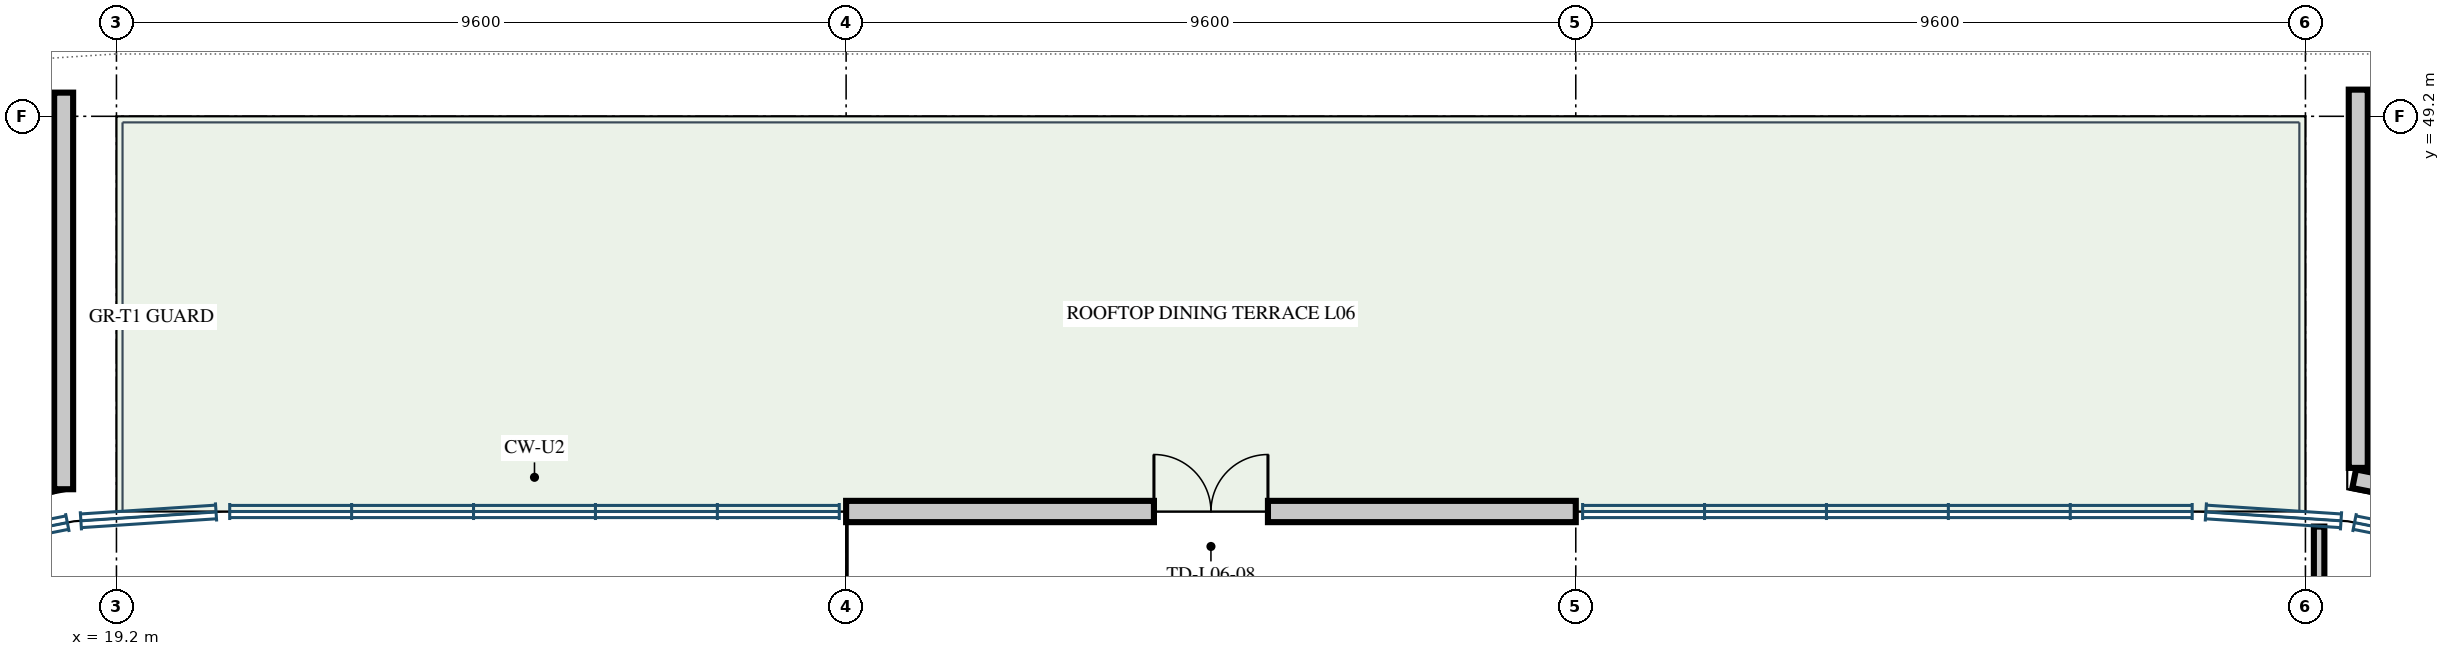
"""IFC4 building model, lengths in metres.
Left out: names, types, materials, properties, quantities, classifications, styles, units other than length and angle.
Written with IfcOpenShell. Run it as: python <this file> out.ifc"""

import sys

from ifc_helpers import new_model, si_unit, direction, frame, frame_2d, origin, place, context, subcontext, project, spatial, rectangle, extrude, element, fill, save


model = new_model("IFC4")
c1 = context("Model", 3, precision=1e-05, world=origin(), true_north=direction((0.0, 1.0)))
c2 = subcontext(c1, "Body", "Model", "MODEL_VIEW")
j1 = project(units=[si_unit("LENGTHUNIT", "METRE"), si_unit("PLANEANGLEUNIT", "RADIAN")], contexts=[c1])
p1 = place(None, origin())
s1 = spatial("IfcSite", under=j1, at=p1, CompositionType="ELEMENT")
p2 = place(p1, origin())
s2 = spatial("IfcBuilding", under=s1, at=p2, CompositionType="ELEMENT")
p3 = place(p2, frame((0.0, 0.0, 29.4)))
s3 = spatial("IfcBuildingStorey", under=s2, at=p3, CompositionType="ELEMENT", Elevation=29.4)
p4 = place(p3, frame((28.8, 44.0, 0.0), z_axis=(0.0, 0.0, 1.0), x_axis=(1.0, 0.0, 0.0)))
e1 = element("IfcWall", 1, at=p4, inside=s3, PredefinedType="SOLIDWALL", context=c2, shape_type="SweptSolid", body=[
    extrude(rectangle(XDim=9.6, YDim=0.28, at=frame_2d((4.8, 0.0))), origin(), (0.0, 0.0, 1.0), 4.525),
])
p5 = place(p4, frame((4.05, 0.0, 0.0)))
e2 = element("IfcOpeningElement", 2, at=p5, cuts=e1, PredefinedType="OPENING", context=c2, shape_type="SweptSolid", body=[
    extrude(rectangle(XDim=1.5, YDim=2.25, at=frame_2d((0.75, 1.125))), frame((0.0, 0.152, 0.0), z_axis=(0.0, -1.0, 0.0), x_axis=(1.0, 0.0, 0.0)), (0.0, 0.0, 1.0), 0.304),
])
p6 = place(p3, frame((18.505, 49.511, 0.0), z_axis=(0.0, 0.0, 1.0), x_axis=(0.0, -1.0, 0.0)))
e3 = element("IfcWall", 3, at=p6, inside=s3, PredefinedType="PARAPET", context=c2, shape_type="SweptSolid", body=[
    extrude(rectangle(XDim=5.218, YDim=0.25, at=frame_2d((2.609, 0.0))), origin(), (0.0, 0.0, 1.0), 1.2),
])
p7 = place(p3, frame((18.341, 44.388, 0.0), z_axis=(0.0, 0.0, 1.0), x_axis=(-0.980789397091, -0.195069624886, 0.0)))
e4 = element("IfcWall", 4, at=p7, inside=s3, PredefinedType="PARAPET", context=c2, shape_type="SweptSolid", body=[
    extrude(rectangle(XDim=1.795, YDim=0.25, at=frame_2d((0.897, 0.0))), origin(), (0.0, 0.0, 1.0), 1.2),
])
p8 = place(p3, frame((50.619, 44.038, 0.0), z_axis=(0.0, 0.0, 1.0), x_axis=(-0.980780345025, 0.195115132196, 0.0)))
e5 = element("IfcWall", 5, at=p8, inside=s3, PredefinedType="PARAPET", context=c2, shape_type="SweptSolid", body=[
    extrude(rectangle(XDim=2.017, YDim=0.25, at=frame_2d((1.009, 0.0))), origin(), (0.0, 0.0, 1.0), 1.2),
])
p9 = place(p3, frame((48.695, 44.574, 0.0), z_axis=(0.0, 0.0, 1.0), x_axis=(0.0, 1.0, 0.0)))
e6 = element("IfcWall", 6, at=p9, inside=s3, PredefinedType="PARAPET", context=c2, shape_type="SweptSolid", body=[
    extrude(rectangle(XDim=4.977, YDim=0.25, at=frame_2d((2.489, 0.0))), origin(), (0.0, 0.0, 1.0), 1.2),
])
p10 = place(p3, frame((48.848, 49.386, 0.0), z_axis=(0.0, 0.0, 1.0), x_axis=(0.997852891504, -0.06549509079, 0.0)))
e7 = element("IfcWall", 7, at=p10, inside=s3, PredefinedType="PARAPET", context=c2, shape_type="SweptSolid", body=[
    extrude(rectangle(XDim=0.902, YDim=0.25, at=frame_2d((0.451, 0.0))), origin(), (0.0, 0.0, 1.0), 1.2),
])
p11 = place(p3, frame((48.18, 38.77, 0.0), z_axis=(0.0, 0.0, 1.0), x_axis=(0.0, 1.0, 0.0)))
e8 = element("IfcWall", 8, at=p11, inside=s3, PredefinedType="PARTITIONING", context=c2, shape_type="SweptSolid", body=[
    extrude(rectangle(XDim=5.032, YDim=0.138, at=frame_2d((2.516, 0.0))), origin(), (0.0, 0.0, 1.0), 4.525),
])
p12 = place(p5, origin())
e9 = element("IfcDoor", 9, at=p12, inside=s3, OperationType="DOUBLE_DOOR_SINGLE_SWING", PredefinedType="DOOR", context=c2, shape_type="SweptSolid", body=[
    extrude(rectangle(XDim=1.5, YDim=2.25, at=frame_2d((0.75, 1.125))), frame((0.0, 0.025, 0.0), z_axis=(0.0, -1.0, 0.0), x_axis=(1.0, 0.0, 0.0)), (0.0, 0.0, 1.0), 0.05),
])
fill(e2, e9)
save(model, sys.argv[1])
